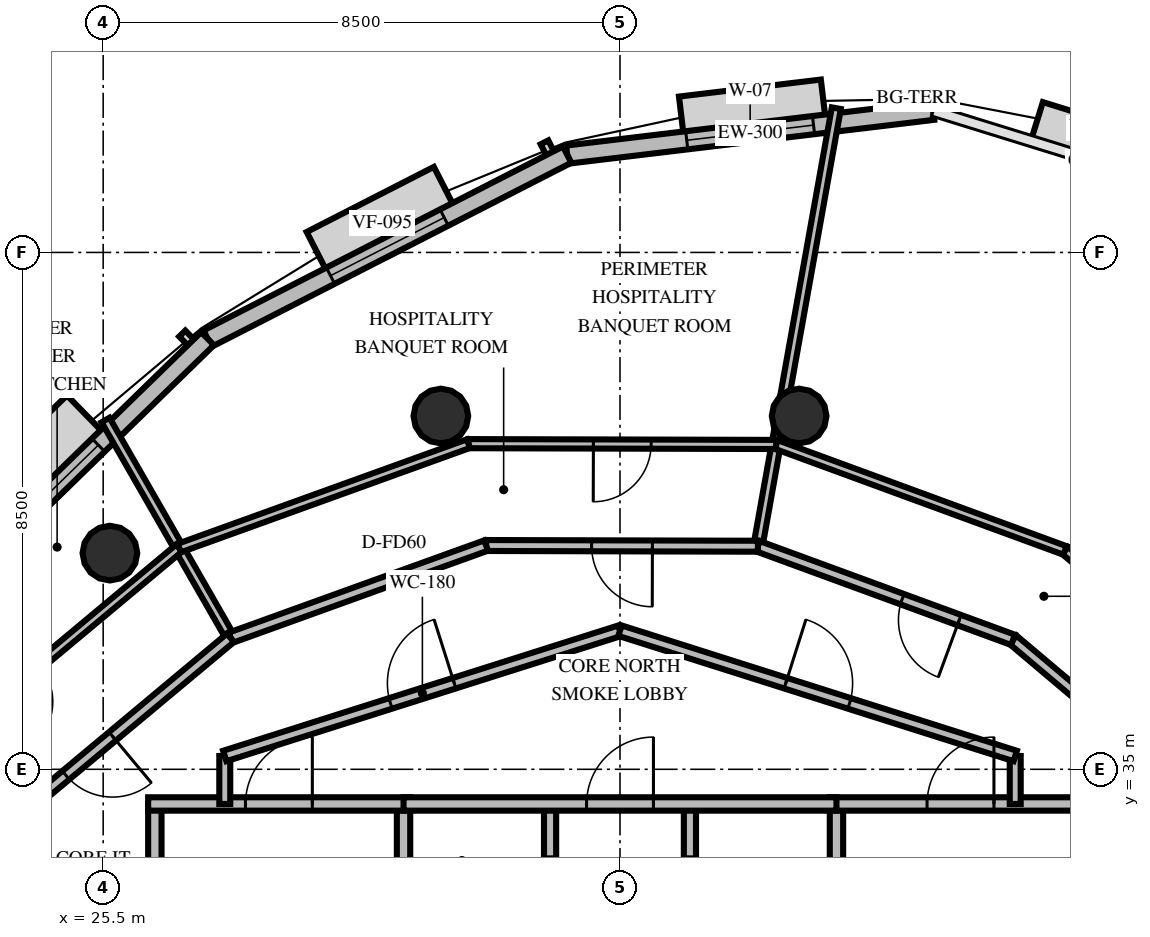
"""IFC4 building model, lengths in metres.
Left out: names, types, materials, properties, quantities, classifications, styles, units other than length and angle.
Written with IfcOpenShell. Run it as: python <this file> out.ifc"""

import sys

from ifc_helpers import new_model, si_unit, direction, frame, frame_2d, origin, origin_2d, place, context, subcontext, project, spatial, rectangle, circle, extrude, element, fill, save


model = new_model("IFC4")
c1 = context("Model", 3, precision=1e-05, world=origin(), true_north=direction((0.0, 1.0)))
c2 = subcontext(c1, "Body", "Model", "MODEL_VIEW")
j1 = project(units=[si_unit("LENGTHUNIT", "METRE"), si_unit("PLANEANGLEUNIT", "RADIAN")], contexts=[c1])
p1 = place(None, origin())
s1 = spatial("IfcSite", under=j1, at=p1, CompositionType="ELEMENT")
p2 = place(p1, origin())
s2 = spatial("IfcBuilding", under=s1, at=p2, CompositionType="ELEMENT")
p3 = place(p2, frame((0.0, 0.0, 277.2)))
s3 = spatial("IfcBuildingStorey", under=s2, at=p3, CompositionType="ELEMENT", Elevation=277.2)
for number, where, z_axis, x_axis in (
    (1, (36.946, 40.81, 0.0), (0.0, 0.0, 1.0), (1.0, 0.0, 0.0)),
    (2, (31.054, 40.81, 0.0), (0.0, 0.0, 1.0), (1.0, 0.0, 0.0)),
    (3, (25.611, 38.555, 0.0), (0.0, 0.0, 1.0), (1.0, 0.0, 0.0)),
):
    element("IfcColumn", number, at=place(p3, frame(where, z_axis=z_axis, x_axis=x_axis)), inside=s3, PredefinedType="COLUMN", context=c2, shape_type="SweptSolid", body=[
        extrude(circle(Radius=0.45, at=origin_2d()), origin(), (0.0, 0.0, 1.0), 3.6),
    ])
p4 = place(p3, frame((39.15, 45.83, 0.0), z_axis=(0.0, 0.0, 1.0), x_axis=(-0.992897596108, -0.118972112883, 0.0)))
e4 = element("IfcWall", 4, at=p4, inside=s3, PredefinedType="SOLIDWALL", context=c2, shape_type="SweptSolid", body=[
    extrude(rectangle(XDim=6.062, YDim=0.3, at=frame_2d((3.031, 0.0))), origin(), (0.0, 0.0, 1.0), 2.76),
])
p5 = place(p4, frame((1.981, 0.0, 0.8)))
e5 = element("IfcOpeningElement", 5, at=p5, cuts=e4, PredefinedType="OPENING", context=c2, shape_type="SweptSolid", body=[
    extrude(rectangle(XDim=2.1, YDim=1.85, at=frame_2d((1.05, 0.925))), frame((0.0, 0.16, 0.0), z_axis=(0.0, -1.0, 0.0), x_axis=(1.0, 0.0, 0.0)), (0.0, 0.0, 1.0), 0.32),
])
p6 = place(p3, frame((33.131, 45.108, 0.0), z_axis=(0.0, 0.0, 1.0), x_axis=(-0.890243311172, -0.455485287263, 0.0)))
e6 = element("IfcWall", 6, at=p6, inside=s3, PredefinedType="SOLIDWALL", context=c2, shape_type="SweptSolid", body=[
    extrude(rectangle(XDim=6.643, YDim=0.3, at=frame_2d((3.322, 0.0))), origin(), (0.0, 0.0, 1.0), 2.76),
])
p7 = place(p6, frame((2.272, 0.0, 0.8)))
e7 = element("IfcOpeningElement", 7, at=p7, cuts=e6, PredefinedType="OPENING", context=c2, shape_type="SweptSolid", body=[
    extrude(rectangle(XDim=2.1, YDim=1.85, at=frame_2d((1.05, 0.925))), frame((0.0, 0.16, 0.0), z_axis=(0.0, -1.0, 0.0), x_axis=(1.0, 0.0, 0.0)), (0.0, 0.0, 1.0), 0.32),
])
p8 = place(p3, frame((27.217, 42.083, 0.0), z_axis=(0.0, 0.0, 1.0), x_axis=(-0.716208919205, -0.697885939142, 0.0)))
e8 = element("IfcWall", 8, at=p8, inside=s3, PredefinedType="SOLIDWALL", context=c2, shape_type="SweptSolid", body=[
    extrude(rectangle(XDim=7.115, YDim=0.3, at=frame_2d((3.558, 0.0))), origin(), (0.0, 0.0, 1.0), 2.76),
])
p9 = place(p8, frame((2.508, 0.0, 0.8)))
e9 = element("IfcOpeningElement", 9, at=p9, cuts=e8, PredefinedType="OPENING", context=c2, shape_type="SweptSolid", body=[
    extrude(rectangle(XDim=2.1, YDim=1.85, at=frame_2d((1.05, 0.925))), frame((0.0, 0.16, 0.0), z_axis=(0.0, -1.0, 0.0), x_axis=(1.0, 0.0, 0.0)), (0.0, 0.0, 1.0), 0.32),
])
p10 = place(p3, frame((26.35, 30.05, 0.0), z_axis=(0.0, 0.0, 1.0), x_axis=(0.0, 1.0, 0.0)))
e10 = element("IfcWall", 10, at=p10, inside=s3, PredefinedType="SOLIDWALL", context=c2, shape_type="SweptSolid", body=[
    extrude(rectangle(XDim=4.38, YDim=0.22, at=frame_2d((2.19, 0.0))), origin(), (0.0, 0.0, 1.0), 2.46),
])
p11 = place(p3, frame((30.44, 30.05, 0.0), z_axis=(0.0, 0.0, 1.0), x_axis=(0.0, 1.0, 0.0)))
e11 = element("IfcWall", 11, at=p11, inside=s3, PredefinedType="SOLIDWALL", context=c2, shape_type="SweptSolid", body=[
    extrude(rectangle(XDim=4.38, YDim=0.22, at=frame_2d((2.19, 0.0))), origin(), (0.0, 0.0, 1.0), 2.46),
])
p12 = place(p11, frame((0.8, 0.0, 0.0)))
e12 = element("IfcOpeningElement", 12, at=p12, cuts=e11, PredefinedType="OPENING", context=c2, shape_type="SweptSolid", body=[
    extrude(rectangle(XDim=1.05, YDim=2.1, at=frame_2d((0.525, 1.05))), frame((0.0, 0.12, 0.0), z_axis=(0.0, -1.0, 0.0), x_axis=(1.0, 0.0, 0.0)), (0.0, 0.0, 1.0), 0.24),
])
p13 = place(p3, frame((26.24, 34.43, 0.0), z_axis=(0.0, 0.0, 1.0), x_axis=(1.0, 0.0, 0.0)))
e13 = element("IfcWall", 13, at=p13, inside=s3, PredefinedType="SOLIDWALL", context=c2, shape_type="SweptSolid", body=[
    extrude(rectangle(XDim=4.31, YDim=0.22, at=frame_2d((2.155, 0.0))), origin(), (0.0, 0.0, 1.0), 2.46),
])
p14 = place(p13, frame((1.6, 0.0, 0.0)))
e14 = element("IfcOpeningElement", 14, at=p14, cuts=e13, PredefinedType="OPENING", context=c2, shape_type="SweptSolid", body=[
    extrude(rectangle(XDim=1.1, YDim=2.15, at=frame_2d((0.55, 1.075))), frame((0.0, 0.12, 0.0), z_axis=(0.0, -1.0, 0.0), x_axis=(1.0, 0.0, 0.0)), (0.0, 0.0, 1.0), 0.24),
])
p15 = place(p3, frame((32.85, 30.05, 0.0), z_axis=(0.0, 0.0, 1.0), x_axis=(0.0, 1.0, 0.0)))
e15 = element("IfcWall", 15, at=p15, inside=s3, PredefinedType="SOLIDWALL", context=c2, shape_type="SweptSolid", body=[
    extrude(rectangle(XDim=4.38, YDim=0.2, at=frame_2d((2.19, 0.0))), origin(), (0.0, 0.0, 1.0), 2.46),
])
p16 = place(p15, frame((2.65, 0.0, 0.0)))
e16 = element("IfcOpeningElement", 16, at=p16, cuts=e15, PredefinedType="OPENING", context=c2, shape_type="SweptSolid", body=[
    extrude(rectangle(XDim=0.86, YDim=2.05, at=frame_2d((0.43, 1.025))), frame((0.0, 0.11, 0.0), z_axis=(0.0, -1.0, 0.0), x_axis=(1.0, 0.0, 0.0)), (0.0, 0.0, 1.0), 0.22),
])
p17 = place(p3, frame((37.56, 30.05, 0.0), z_axis=(0.0, 0.0, 1.0), x_axis=(0.0, 1.0, 0.0)))
e17 = element("IfcWall", 17, at=p17, inside=s3, PredefinedType="SOLIDWALL", context=c2, shape_type="SweptSolid", body=[
    extrude(rectangle(XDim=4.38, YDim=0.22, at=frame_2d((2.19, 0.0))), origin(), (0.0, 0.0, 1.0), 2.46),
])
p18 = place(p17, frame((0.8, 0.0, 0.0)))
e18 = element("IfcOpeningElement", 18, at=p18, cuts=e17, PredefinedType="OPENING", context=c2, shape_type="SweptSolid", body=[
    extrude(rectangle(XDim=1.05, YDim=2.1, at=frame_2d((0.525, 1.05))), frame((0.0, 0.12, 0.0), z_axis=(0.0, -1.0, 0.0), x_axis=(1.0, 0.0, 0.0)), (0.0, 0.0, 1.0), 0.24),
])
p19 = place(p3, frame((37.45, 34.43, 0.0), z_axis=(0.0, 0.0, 1.0), x_axis=(1.0, 0.0, 0.0)))
e19 = element("IfcWall", 19, at=p19, inside=s3, PredefinedType="SOLIDWALL", context=c2, shape_type="SweptSolid", body=[
    extrude(rectangle(XDim=4.31, YDim=0.22, at=frame_2d((2.155, 0.0))), origin(), (0.0, 0.0, 1.0), 2.46),
])
p20 = place(p19, frame((1.6, 0.0, 0.0)))
e20 = element("IfcOpeningElement", 20, at=p20, cuts=e19, PredefinedType="OPENING", context=c2, shape_type="SweptSolid", body=[
    extrude(rectangle(XDim=1.1, YDim=2.15, at=frame_2d((0.55, 1.075))), frame((0.0, 0.12, 0.0), z_axis=(0.0, -1.0, 0.0), x_axis=(1.0, 0.0, 0.0)), (0.0, 0.0, 1.0), 0.24),
])
p21 = place(p3, frame((35.15, 30.05, 0.0), z_axis=(0.0, 0.0, 1.0), x_axis=(0.0, 1.0, 0.0)))
e21 = element("IfcWall", 21, at=p21, inside=s3, PredefinedType="SOLIDWALL", context=c2, shape_type="SweptSolid", body=[
    extrude(rectangle(XDim=4.38, YDim=0.2, at=frame_2d((2.19, 0.0))), origin(), (0.0, 0.0, 1.0), 2.46),
])
p22 = place(p21, frame((2.65, 0.0, 0.0)))
e22 = element("IfcOpeningElement", 22, at=p22, cuts=e21, PredefinedType="OPENING", context=c2, shape_type="SweptSolid", body=[
    extrude(rectangle(XDim=0.86, YDim=2.05, at=frame_2d((0.43, 1.025))), frame((0.0, 0.11, 0.0), z_axis=(0.0, -1.0, 0.0), x_axis=(1.0, 0.0, 0.0)), (0.0, 0.0, 1.0), 0.22),
])
p23 = place(p3, frame((30.44, 34.43, 0.0), z_axis=(0.0, 0.0, 1.0), x_axis=(1.0, 0.0, 0.0)))
e23 = element("IfcWall", 23, at=p23, inside=s3, PredefinedType="SOLIDWALL", context=c2, shape_type="SweptSolid", body=[
    extrude(rectangle(XDim=7.12, YDim=0.22, at=frame_2d((3.56, 0.0))), origin(), (0.0, 0.0, 1.0), 2.46),
])
p24 = place(p23, frame((3.01, 0.0, 0.0)))
e24 = element("IfcOpeningElement", 24, at=p24, cuts=e23, PredefinedType="OPENING", context=c2, shape_type="SweptSolid", body=[
    extrude(rectangle(XDim=1.1, YDim=2.15, at=frame_2d((0.55, 1.075))), frame((0.0, 0.12, 0.0), z_axis=(0.0, -1.0, 0.0), x_axis=(1.0, 0.0, 0.0)), (0.0, 0.0, 1.0), 0.24),
])
for number, where, z_axis, x_axis in (
    (25, (27.5, 34.43, 0.0), (0.0, 0.0, 1.0), (0.0, 1.0, 0.0)),
    (26, (40.5, 35.219, 0.0), (0.0, 0.0, 1.0), (0.0, -1.0, 0.0)),
):
    element("IfcWall", number, at=place(p3, frame(where, z_axis=z_axis, x_axis=x_axis)), inside=s3, PredefinedType="PARTITIONING", context=c2, shape_type="SweptSolid", body=[
        extrude(rectangle(XDim=0.789, YDim=0.18, at=frame_2d((0.395, 0.0))), origin(), (0.0, 0.0, 1.0), 2.46),
    ])
p25 = place(p3, frame((27.5, 35.219, 0.0), z_axis=(0.0, 0.0, 1.0), x_axis=(0.953228121756, 0.302251795518, 0.0)))
e27 = element("IfcWall", 27, at=p25, inside=s3, PredefinedType="PARTITIONING", context=c2, shape_type="SweptSolid", body=[
    extrude(rectangle(XDim=6.819, YDim=0.18, at=frame_2d((3.409, 0.0))), origin(), (0.0, 0.0, 1.0), 2.46),
])
p26 = place(p25, frame((2.86, 0.0, 0.0)))
e28 = element("IfcOpeningElement", 28, at=p26, cuts=e27, PredefinedType="OPENING", context=c2, shape_type="SweptSolid", body=[
    extrude(rectangle(XDim=1.1, YDim=2.15, at=frame_2d((0.55, 1.075))), frame((0.0, 0.1, 0.0), z_axis=(0.0, -1.0, 0.0), x_axis=(1.0, 0.0, 0.0)), (0.0, 0.0, 1.0), 0.2),
])
p27 = place(p3, frame((34.0, 37.28, 0.0), z_axis=(0.0, 0.0, 1.0), x_axis=(0.953228121756, -0.302251795518, 0.0)))
e29 = element("IfcWall", 29, at=p27, inside=s3, PredefinedType="PARTITIONING", context=c2, shape_type="SweptSolid", body=[
    extrude(rectangle(XDim=6.819, YDim=0.18, at=frame_2d((3.409, 0.0))), origin(), (0.0, 0.0, 1.0), 2.46),
])
p28 = place(p27, frame((2.86, 0.0, 0.0)))
e30 = element("IfcOpeningElement", 30, at=p28, cuts=e29, PredefinedType="OPENING", context=c2, shape_type="SweptSolid", body=[
    extrude(rectangle(XDim=1.1, YDim=2.15, at=frame_2d((0.55, 1.075))), frame((0.0, 0.1, 0.0), z_axis=(0.0, -1.0, 0.0), x_axis=(1.0, 0.0, 0.0)), (0.0, 0.0, 1.0), 0.2),
])
p29 = place(p3, frame((36.268, 38.669, 0.0), z_axis=(0.0, 0.0, 1.0), x_axis=(0.176213223455, 0.984352020306, 0.0)))
e31 = element("IfcWall", 31, at=p29, inside=s3, PredefinedType="PARTITIONING", context=c2, shape_type="SweptSolid", body=[
    extrude(rectangle(XDim=7.318, YDim=0.15, at=frame_2d((3.659, 0.0))), origin(), (0.0, 0.0, 1.0), 2.46),
])
p30 = place(p3, frame((43.881, 34.247, 0.0), z_axis=(0.0, 0.0, 1.0), x_axis=(-0.764357098744, 0.644793164976, 0.0)))
e32 = element("IfcWall", 32, at=p30, inside=s3, PredefinedType="PARTITIONING", context=c2, shape_type="SweptSolid", body=[
    extrude(rectangle(XDim=4.47, YDim=0.18, at=frame_2d((2.235, 0.0))), origin(), (0.0, 0.0, 1.0), 2.46),
])
p31 = place(p3, frame((40.464, 37.129, 0.0), z_axis=(0.0, 0.0, 1.0), x_axis=(-0.938786245945, 0.3445001951, 0.0)))
e33 = element("IfcWall", 33, at=p31, inside=s3, PredefinedType="PARTITIONING", context=c2, shape_type="SweptSolid", body=[
    extrude(rectangle(XDim=4.47, YDim=0.18, at=frame_2d((2.235, 0.0))), origin(), (0.0, 0.0, 1.0), 2.46),
])
p32 = place(p31, frame((0.942, 0.0, 0.0)))
e34 = element("IfcOpeningElement", 34, at=p32, cuts=e33, PredefinedType="OPENING", context=c2, shape_type="SweptSolid", body=[
    extrude(rectangle(XDim=1.0, YDim=2.15, at=frame_2d((0.5, 1.075))), frame((0.0, 0.1, 0.0), z_axis=(0.0, -1.0, 0.0), x_axis=(1.0, 0.0, 0.0)), (0.0, 0.0, 1.0), 0.2),
])
p33 = place(p3, frame((45.186, 35.336, 0.0), z_axis=(0.0, 0.0, 1.0), x_axis=(-0.764355389284, 0.644795191415, 0.0)))
e35 = element("IfcWall", 35, at=p33, inside=s3, PredefinedType="PARTITIONING", context=c2, shape_type="SweptSolid", body=[
    extrude(rectangle(XDim=5.06, YDim=0.15, at=frame_2d((2.53, 0.0))), origin(), (0.0, 0.0, 1.0), 2.46),
])
p34 = place(p33, frame((1.117, 0.0, 0.0)))
e36 = element("IfcOpeningElement", 36, at=p34, cuts=e35, PredefinedType="OPENING", context=c2, shape_type="SweptSolid", body=[
    extrude(rectangle(XDim=0.95, YDim=2.15, at=frame_2d((0.475, 1.075))), frame((0.0, 0.085, 0.0), z_axis=(0.0, -1.0, 0.0), x_axis=(1.0, 0.0, 0.0)), (0.0, 0.0, 1.0), 0.17),
])
p35 = place(p3, frame((41.318, 38.599, 0.0), z_axis=(0.0, 0.0, 1.0), x_axis=(-0.938792079833, 0.344484296948, 0.0)))
e37 = element("IfcWall", 37, at=p35, inside=s3, PredefinedType="PARTITIONING", context=c2, shape_type="SweptSolid", body=[
    extrude(rectangle(XDim=5.06, YDim=0.15, at=frame_2d((2.53, 0.0))), origin(), (0.0, 0.0, 1.0), 2.46),
])
p36 = place(p3, frame((27.594, 37.163, 0.0), z_axis=(0.0, 0.0, 1.0), x_axis=(-0.497723411818, 0.867335808859, 0.0)))
e38 = element("IfcWall", 38, at=p36, inside=s3, PredefinedType="PARTITIONING", context=c2, shape_type="SweptSolid", body=[
    extrude(rectangle(XDim=4.13, YDim=0.15, at=frame_2d((2.065, 0.0))), origin(), (0.0, 0.0, 1.0), 2.46),
])
p37 = place(p3, frame((36.268, 38.669, 0.0), z_axis=(0.0, 0.0, 1.0), x_axis=(-0.999996563088, 0.002621795665, 0.0)))
e39 = element("IfcWall", 39, at=p37, inside=s3, PredefinedType="PARTITIONING", context=c2, shape_type="SweptSolid", body=[
    extrude(rectangle(XDim=4.47, YDim=0.18, at=frame_2d((2.235, 0.0))), origin(), (0.0, 0.0, 1.0), 2.46),
])
p38 = place(p37, frame((1.735, 0.0, 0.0)))
e40 = element("IfcOpeningElement", 40, at=p38, cuts=e39, PredefinedType="OPENING", context=c2, shape_type="SweptSolid", body=[
    extrude(rectangle(XDim=1.0, YDim=2.15, at=frame_2d((0.5, 1.075))), frame((0.0, 0.1, 0.0), z_axis=(0.0, -1.0, 0.0), x_axis=(1.0, 0.0, 0.0)), (0.0, 0.0, 1.0), 0.2),
])
p39 = place(p3, frame((31.798, 38.68, 0.0), z_axis=(0.0, 0.0, 1.0), x_axis=(-0.940577162763, -0.339580036057, 0.0)))
e41 = element("IfcWall", 41, at=p39, inside=s3, PredefinedType="PARTITIONING", context=c2, shape_type="SweptSolid", body=[
    extrude(rectangle(XDim=4.47, YDim=0.18, at=frame_2d((2.235, 0.0))), origin(), (0.0, 0.0, 1.0), 2.46),
])
p40 = place(p3, frame((36.568, 40.342, 0.0), z_axis=(0.0, 0.0, 1.0), x_axis=(-0.999996605902, 0.002605414297, 0.0)))
e42 = element("IfcWall", 42, at=p40, inside=s3, PredefinedType="PARTITIONING", context=c2, shape_type="SweptSolid", body=[
    extrude(rectangle(XDim=5.06, YDim=0.15, at=frame_2d((2.53, 0.0))), origin(), (0.0, 0.0, 1.0), 2.46),
])
p41 = place(p40, frame((2.055, 0.0, 0.0)))
e43 = element("IfcOpeningElement", 43, at=p41, cuts=e42, PredefinedType="OPENING", context=c2, shape_type="SweptSolid", body=[
    extrude(rectangle(XDim=0.95, YDim=2.15, at=frame_2d((0.475, 1.075))), frame((0.0, 0.085, 0.0), z_axis=(0.0, -1.0, 0.0), x_axis=(1.0, 0.0, 0.0)), (0.0, 0.0, 1.0), 0.17),
])
p42 = place(p3, frame((31.508, 40.355, 0.0), z_axis=(0.0, 0.0, 1.0), x_axis=(-0.940582581296, -0.339565027297, 0.0)))
e44 = element("IfcWall", 44, at=p42, inside=s3, PredefinedType="PARTITIONING", context=c2, shape_type="SweptSolid", body=[
    extrude(rectangle(XDim=5.06, YDim=0.15, at=frame_2d((2.53, 0.0))), origin(), (0.0, 0.0, 1.0), 2.46),
])
p43 = place(p3, frame((27.594, 37.163, 0.0), z_axis=(0.0, 0.0, 1.0), x_axis=(-0.767746496496, -0.640753710187, 0.0)))
e45 = element("IfcWall", 45, at=p43, inside=s3, PredefinedType="PARTITIONING", context=c2, shape_type="SweptSolid", body=[
    extrude(rectangle(XDim=4.47, YDim=0.18, at=frame_2d((2.235, 0.0))), origin(), (0.0, 0.0, 1.0), 2.46),
])
p44 = place(p43, frame((2.527, 0.0, 0.0)))
e46 = element("IfcOpeningElement", 46, at=p44, cuts=e45, PredefinedType="OPENING", context=c2, shape_type="SweptSolid", body=[
    extrude(rectangle(XDim=1.0, YDim=2.15, at=frame_2d((0.5, 1.075))), frame((0.0, 0.1, 0.0), z_axis=(0.0, -1.0, 0.0), x_axis=(1.0, 0.0, 0.0)), (0.0, 0.0, 1.0), 0.2),
])
p45 = place(p3, frame((26.748, 38.637, 0.0), z_axis=(0.0, 0.0, 1.0), x_axis=(-0.767722747494, -0.640782164999, 0.0)))
e47 = element("IfcWall", 47, at=p45, inside=s3, PredefinedType="PARTITIONING", context=c2, shape_type="SweptSolid", body=[
    extrude(rectangle(XDim=5.06, YDim=0.15, at=frame_2d((2.53, 0.0))), origin(), (0.0, 0.0, 1.0), 2.46),
])
p46 = place(p45, frame((2.993, 0.0, 0.0)))
e48 = element("IfcOpeningElement", 48, at=p46, cuts=e47, PredefinedType="OPENING", context=c2, shape_type="SweptSolid", body=[
    extrude(rectangle(XDim=0.95, YDim=2.15, at=frame_2d((0.475, 1.075))), frame((0.0, 0.085, 0.0), z_axis=(0.0, -1.0, 0.0), x_axis=(1.0, 0.0, 0.0)), (0.0, 0.0, 1.0), 0.17),
])
p47 = place(p5, origin())
e49 = element("IfcWindow", 49, at=p47, inside=s3, PartitioningType="SINGLE_PANEL", PredefinedType="WINDOW", context=c2, shape_type="SweptSolid", body=[
    extrude(rectangle(XDim=2.1, YDim=1.85, at=frame_2d((1.05, 0.925))), frame((0.0, 0.03, 0.0), z_axis=(0.0, -1.0, 0.0), x_axis=(1.0, 0.0, 0.0)), (0.0, 0.0, 1.0), 0.06),
])
fill(e5, e49)
p48 = place(p7, origin())
e50 = element("IfcWindow", 50, at=p48, inside=s3, PartitioningType="SINGLE_PANEL", PredefinedType="WINDOW", context=c2, shape_type="SweptSolid", body=[
    extrude(rectangle(XDim=2.1, YDim=1.85, at=frame_2d((1.05, 0.925))), frame((0.0, 0.03, 0.0), z_axis=(0.0, -1.0, 0.0), x_axis=(1.0, 0.0, 0.0)), (0.0, 0.0, 1.0), 0.06),
])
fill(e7, e50)
p49 = place(p9, origin())
e51 = element("IfcWindow", 51, at=p49, inside=s3, PartitioningType="SINGLE_PANEL", PredefinedType="WINDOW", context=c2, shape_type="SweptSolid", body=[
    extrude(rectangle(XDim=2.1, YDim=1.85, at=frame_2d((1.05, 0.925))), frame((0.0, 0.03, 0.0), z_axis=(0.0, -1.0, 0.0), x_axis=(1.0, 0.0, 0.0)), (0.0, 0.0, 1.0), 0.06),
])
fill(e9, e51)
p50 = place(p14, origin())
e52 = element("IfcDoor", 52, at=p50, inside=s3, OperationType="SINGLE_SWING_RIGHT", PredefinedType="DOOR", context=c2, shape_type="SweptSolid", body=[
    extrude(rectangle(XDim=1.1, YDim=2.15, at=frame_2d((0.55, 1.075))), frame((0.0, 0.025, 0.0), z_axis=(0.0, -1.0, 0.0), x_axis=(1.0, 0.0, 0.0)), (0.0, 0.0, 1.0), 0.05),
])
fill(e14, e52)
p51 = place(p16, origin())
e53 = element("IfcDoor", 53, at=p51, inside=s3, OperationType="SINGLE_SWING_LEFT", PredefinedType="TRAPDOOR", context=c2, shape_type="SweptSolid", body=[
    extrude(rectangle(XDim=0.86, YDim=2.05, at=frame_2d((0.43, 1.025))), frame((0.0, 0.025, 0.0), z_axis=(0.0, -1.0, 0.0), x_axis=(1.0, 0.0, 0.0)), (0.0, 0.0, 1.0), 0.05),
])
fill(e16, e53)
p52 = place(p20, origin())
e54 = element("IfcDoor", 54, at=p52, inside=s3, OperationType="SINGLE_SWING_RIGHT", PredefinedType="DOOR", context=c2, shape_type="SweptSolid", body=[
    extrude(rectangle(XDim=1.1, YDim=2.15, at=frame_2d((0.55, 1.075))), frame((0.0, 0.025, 0.0), z_axis=(0.0, -1.0, 0.0), x_axis=(1.0, 0.0, 0.0)), (0.0, 0.0, 1.0), 0.05),
])
fill(e20, e54)
p53 = place(p22, origin())
e55 = element("IfcDoor", 55, at=p53, inside=s3, OperationType="SINGLE_SWING_LEFT", PredefinedType="TRAPDOOR", context=c2, shape_type="SweptSolid", body=[
    extrude(rectangle(XDim=0.86, YDim=2.05, at=frame_2d((0.43, 1.025))), frame((0.0, 0.025, 0.0), z_axis=(0.0, -1.0, 0.0), x_axis=(1.0, 0.0, 0.0)), (0.0, 0.0, 1.0), 0.05),
])
fill(e22, e55)
p54 = place(p24, origin())
e56 = element("IfcDoor", 56, at=p54, inside=s3, OperationType="SINGLE_SWING_RIGHT", PredefinedType="DOOR", context=c2, shape_type="SweptSolid", body=[
    extrude(rectangle(XDim=1.1, YDim=2.15, at=frame_2d((0.55, 1.075))), frame((0.0, 0.025, 0.0), z_axis=(0.0, -1.0, 0.0), x_axis=(1.0, 0.0, 0.0)), (0.0, 0.0, 1.0), 0.05),
])
fill(e24, e56)
p55 = place(p26, origin())
e57 = element("IfcDoor", 57, at=p55, inside=s3, OperationType="SINGLE_SWING_RIGHT", PredefinedType="DOOR", context=c2, shape_type="SweptSolid", body=[
    extrude(rectangle(XDim=1.1, YDim=2.15, at=frame_2d((0.55, 1.075))), frame((0.0, 0.025, 0.0), z_axis=(0.0, -1.0, 0.0), x_axis=(1.0, 0.0, 0.0)), (0.0, 0.0, 1.0), 0.05),
])
fill(e28, e57)
p56 = place(p28, origin())
e58 = element("IfcDoor", 58, at=p56, inside=s3, OperationType="SINGLE_SWING_LEFT", PredefinedType="DOOR", context=c2, shape_type="SweptSolid", body=[
    extrude(rectangle(XDim=1.1, YDim=2.15, at=frame_2d((0.55, 1.075))), frame((0.0, 0.025, 0.0), z_axis=(0.0, -1.0, 0.0), x_axis=(1.0, 0.0, 0.0)), (0.0, 0.0, 1.0), 0.05),
])
fill(e30, e58)
p57 = place(p32, origin())
e59 = element("IfcDoor", 59, at=p57, inside=s3, OperationType="SINGLE_SWING_LEFT", PredefinedType="DOOR", context=c2, shape_type="SweptSolid", body=[
    extrude(rectangle(XDim=1.0, YDim=2.15, at=frame_2d((0.5, 1.075))), frame((0.0, 0.025, 0.0), z_axis=(0.0, -1.0, 0.0), x_axis=(1.0, 0.0, 0.0)), (0.0, 0.0, 1.0), 0.05),
])
fill(e34, e59)
p58 = place(p38, origin())
e60 = element("IfcDoor", 60, at=p58, inside=s3, OperationType="SINGLE_SWING_LEFT", PredefinedType="DOOR", context=c2, shape_type="SweptSolid", body=[
    extrude(rectangle(XDim=1.0, YDim=2.15, at=frame_2d((0.5, 1.075))), frame((0.0, 0.025, 0.0), z_axis=(0.0, -1.0, 0.0), x_axis=(1.0, 0.0, 0.0)), (0.0, 0.0, 1.0), 0.05),
])
fill(e40, e60)
p59 = place(p41, origin())
e61 = element("IfcDoor", 61, at=p59, inside=s3, OperationType="SINGLE_SWING_RIGHT", PredefinedType="DOOR", context=c2, shape_type="SweptSolid", body=[
    extrude(rectangle(XDim=0.95, YDim=2.15, at=frame_2d((0.475, 1.075))), frame((0.0, 0.025, 0.0), z_axis=(0.0, -1.0, 0.0), x_axis=(1.0, 0.0, 0.0)), (0.0, 0.0, 1.0), 0.05),
])
fill(e43, e61)
p60 = place(p44, origin())
e62 = element("IfcDoor", 62, at=p60, inside=s3, OperationType="SINGLE_SWING_LEFT", PredefinedType="DOOR", context=c2, shape_type="SweptSolid", body=[
    extrude(rectangle(XDim=1.0, YDim=2.15, at=frame_2d((0.5, 1.075))), frame((0.0, 0.025, 0.0), z_axis=(0.0, -1.0, 0.0), x_axis=(1.0, 0.0, 0.0)), (0.0, 0.0, 1.0), 0.05),
])
fill(e46, e62)
save(model, sys.argv[1])
